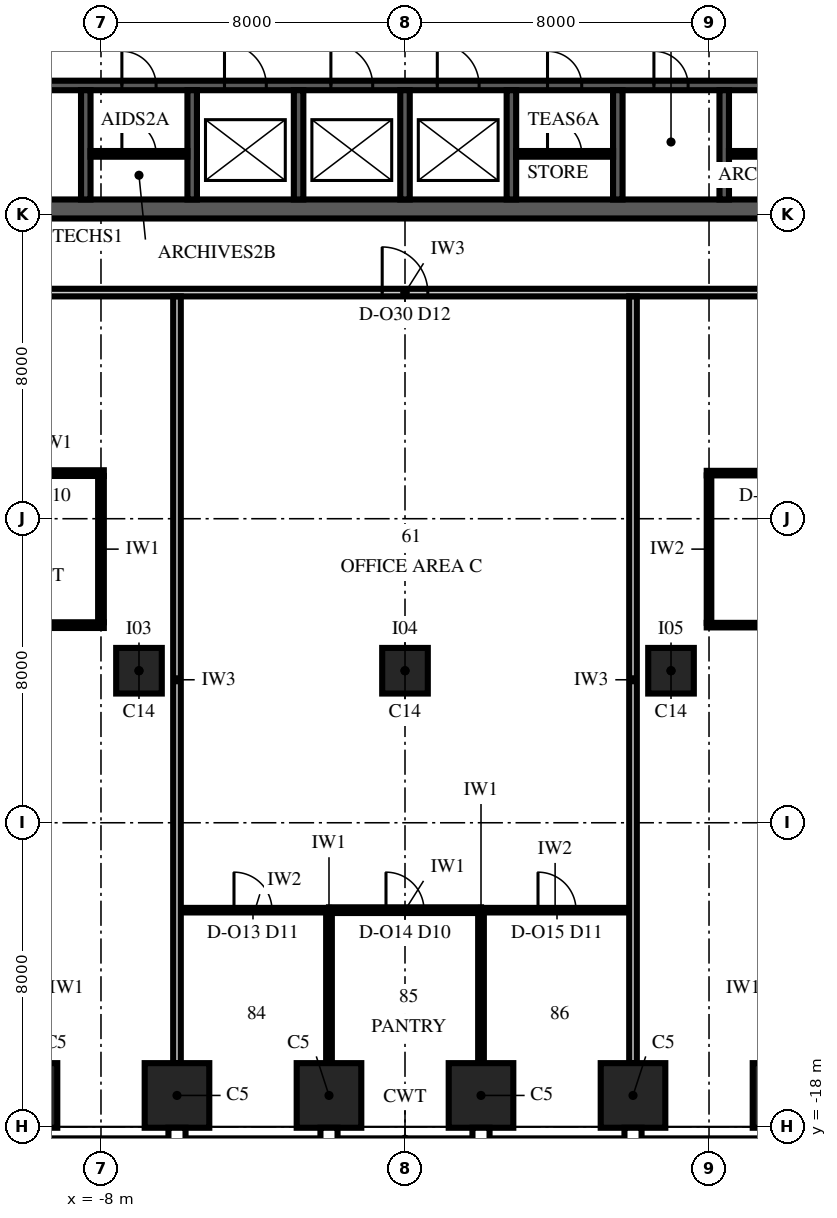
"""IFC4 building model, lengths in metres.
Left out: names, types, materials, properties, quantities, classifications, styles, units other than length and angle.
Written with IfcOpenShell. Run it as: python <this file> out.ifc"""

import sys

from ifc_helpers import new_model, si_unit, direction, frame, frame_2d, origin, origin_2d, place, context, subcontext, project, spatial, rectangle, extrude, element, fill, save


model = new_model("IFC4")
c1 = context("Model", 3, precision=1e-05, world=origin(), true_north=direction((0.0, 1.0)))
c2 = subcontext(c1, "Body", "Model", "MODEL_VIEW")
j1 = project(units=[si_unit("LENGTHUNIT", "METRE"), si_unit("PLANEANGLEUNIT", "RADIAN")], contexts=[c1])
p1 = place(None, origin())
s1 = spatial("IfcSite", under=j1, at=p1, CompositionType="ELEMENT")
p2 = place(p1, origin())
s2 = spatial("IfcBuilding", under=s1, at=p2, CompositionType="ELEMENT")
p3 = place(p2, frame((0.0, 0.0, 248.0)))
s3 = spatial("IfcBuildingStorey", under=s2, at=p3, CompositionType="ELEMENT", Elevation=248.0)
for number, where, z_axis, x_axis in (
    (1, (-10.0, -17.175, 0.0), (0.0, 0.0, 1.0), (1.0, 0.0, 0.0)),
    (2, (-6.0, -17.175, 0.0), (0.0, 0.0, 1.0), (1.0, 0.0, 0.0)),
    (3, (-2.0, -17.175, 0.0), (0.0, 0.0, 1.0), (1.0, 0.0, 0.0)),
    (4, (2.0, -17.175, 0.0), (0.0, 0.0, 1.0), (1.0, 0.0, 0.0)),
    (5, (6.0, -17.175, 0.0), (0.0, 0.0, 1.0), (1.0, 0.0, 0.0)),
    (6, (10.0, -17.175, 0.0), (0.0, 0.0, 1.0), (1.0, 0.0, 0.0)),
):
    element("IfcColumn", number, at=place(p3, frame(where, z_axis=z_axis, x_axis=x_axis)), inside=s3, PredefinedType="COLUMN", context=c2, shape_type="SweptSolid", body=[
        extrude(rectangle(XDim=1.7, YDim=1.7, at=origin_2d()), origin(), (0.0, 0.0, 1.0), 4.0),
    ])
for number, where, z_axis, x_axis in (
    (7, (-7.0, -6.0, 0.0), (0.0, 0.0, 1.0), (1.0, 0.0, 0.0)),
    (8, (0.0, -6.0, 0.0), (0.0, 0.0, 1.0), (1.0, 0.0, 0.0)),
    (9, (7.0, -6.0, 0.0), (0.0, 0.0, 1.0), (1.0, 0.0, 0.0)),
):
    element("IfcColumn", number, at=place(p3, frame(where, z_axis=z_axis, x_axis=x_axis)), inside=s3, PredefinedType="COLUMN", context=c2, shape_type="SweptSolid", body=[
        extrude(rectangle(XDim=1.2, YDim=1.2, at=origin_2d()), origin(), (0.0, 0.0, 1.0), 4.0),
    ])
p4 = place(p3, frame((-13.85, 6.15, 0.0), z_axis=(0.0, 0.0, 1.0), x_axis=(1.0, 0.0, 0.0)))
e10 = element("IfcWall", 10, at=p4, inside=s3, PredefinedType="SHEAR", context=c2, shape_type="SweptSolid", body=[
    extrude(rectangle(XDim=27.7, YDim=0.5, at=frame_2d((13.85, 0.0))), origin(), (0.0, 0.0, 1.0), 4.0),
])
p5 = place(p3, frame((-13.6, 9.4, 0.0), z_axis=(0.0, 0.0, 1.0), x_axis=(1.0, 0.0, 0.0)))
e11 = element("IfcWall", 11, at=p5, inside=s3, PredefinedType="SHEAR", context=c2, shape_type="SweptSolid", body=[
    extrude(rectangle(XDim=27.2, YDim=0.25, at=frame_2d((13.6, 0.0))), origin(), (0.0, 0.0, 1.0), 4.0),
])
p6 = place(p5, frame((8.85, 0.0, 0.0)))
e12 = element("IfcOpeningElement", 12, at=p6, cuts=e11, PredefinedType="OPENING", context=c2, shape_type="SweptSolid", body=[
    extrude(rectangle(XDim=1.1, YDim=2.1, at=frame_2d((0.55, 1.05))), frame((0.0, 0.14, 0.0), z_axis=(0.0, -1.0, 0.0), x_axis=(1.0, 0.0, 0.0)), (0.0, 0.0, 1.0), 0.28),
])
p7 = place(p5, frame((11.65, 0.0, 0.0)))
e13 = element("IfcOpeningElement", 13, at=p7, cuts=e11, PredefinedType="OPENING", context=c2, shape_type="SweptSolid", body=[
    extrude(rectangle(XDim=1.1, YDim=2.1, at=frame_2d((0.55, 1.05))), frame((0.0, 0.14, 0.0), z_axis=(0.0, -1.0, 0.0), x_axis=(1.0, 0.0, 0.0)), (0.0, 0.0, 1.0), 0.28),
])
p8 = place(p5, frame((14.45, 0.0, 0.0)))
e14 = element("IfcOpeningElement", 14, at=p8, cuts=e11, PredefinedType="OPENING", context=c2, shape_type="SweptSolid", body=[
    extrude(rectangle(XDim=1.1, YDim=2.1, at=frame_2d((0.55, 1.05))), frame((0.0, 0.14, 0.0), z_axis=(0.0, -1.0, 0.0), x_axis=(1.0, 0.0, 0.0)), (0.0, 0.0, 1.0), 0.28),
])
p9 = place(p5, frame((0.55, 0.0, 0.0)))
e15 = element("IfcOpeningElement", 15, at=p9, cuts=e11, PredefinedType="OPENING", context=c2, shape_type="SweptSolid", body=[
    extrude(rectangle(XDim=0.9, YDim=2.1, at=frame_2d((0.45, 1.05))), frame((0.0, 0.14, 0.0), z_axis=(0.0, -1.0, 0.0), x_axis=(1.0, 0.0, 0.0)), (0.0, 0.0, 1.0), 0.28),
])
p10 = place(p5, frame((3.35, 0.0, 0.0)))
e16 = element("IfcOpeningElement", 16, at=p10, cuts=e11, PredefinedType="OPENING", context=c2, shape_type="SweptSolid", body=[
    extrude(rectangle(XDim=0.9, YDim=2.1, at=frame_2d((0.45, 1.05))), frame((0.0, 0.14, 0.0), z_axis=(0.0, -1.0, 0.0), x_axis=(1.0, 0.0, 0.0)), (0.0, 0.0, 1.0), 0.28),
])
p11 = place(p5, frame((6.15, 0.0, 0.0)))
e17 = element("IfcOpeningElement", 17, at=p11, cuts=e11, PredefinedType="OPENING", context=c2, shape_type="SweptSolid", body=[
    extrude(rectangle(XDim=0.9, YDim=2.1, at=frame_2d((0.45, 1.05))), frame((0.0, 0.14, 0.0), z_axis=(0.0, -1.0, 0.0), x_axis=(1.0, 0.0, 0.0)), (0.0, 0.0, 1.0), 0.28),
])
p12 = place(p5, frame((17.35, 0.0, 0.0)))
e18 = element("IfcOpeningElement", 18, at=p12, cuts=e11, PredefinedType="OPENING", context=c2, shape_type="SweptSolid", body=[
    extrude(rectangle(XDim=0.9, YDim=2.1, at=frame_2d((0.45, 1.05))), frame((0.0, 0.14, 0.0), z_axis=(0.0, -1.0, 0.0), x_axis=(1.0, 0.0, 0.0)), (0.0, 0.0, 1.0), 0.28),
])
p13 = place(p5, frame((20.15, 0.0, 0.0)))
e19 = element("IfcOpeningElement", 19, at=p13, cuts=e11, PredefinedType="OPENING", context=c2, shape_type="SweptSolid", body=[
    extrude(rectangle(XDim=0.9, YDim=2.1, at=frame_2d((0.45, 1.05))), frame((0.0, 0.14, 0.0), z_axis=(0.0, -1.0, 0.0), x_axis=(1.0, 0.0, 0.0)), (0.0, 0.0, 1.0), 0.28),
])
p14 = place(p5, frame((22.95, 0.0, 0.0)))
e20 = element("IfcOpeningElement", 20, at=p14, cuts=e11, PredefinedType="OPENING", context=c2, shape_type="SweptSolid", body=[
    extrude(rectangle(XDim=0.9, YDim=2.1, at=frame_2d((0.45, 1.05))), frame((0.0, 0.14, 0.0), z_axis=(0.0, -1.0, 0.0), x_axis=(1.0, 0.0, 0.0)), (0.0, 0.0, 1.0), 0.28),
])
for number, where, z_axis, x_axis in (
    (21, (-8.4, 6.4, 0.0), (0.0, 0.0, 1.0), (0.0, 1.0, 0.0)),
    (22, (-5.6, 6.4, 0.0), (0.0, 0.0, 1.0), (0.0, 1.0, 0.0)),
    (23, (-2.8, 6.4, 0.0), (0.0, 0.0, 1.0), (0.0, 1.0, 0.0)),
    (24, (0.0, 6.4, 0.0), (0.0, 0.0, 1.0), (0.0, 1.0, 0.0)),
    (25, (2.8, 6.4, 0.0), (0.0, 0.0, 1.0), (0.0, 1.0, 0.0)),
    (26, (5.6, 6.4, 0.0), (0.0, 0.0, 1.0), (0.0, 1.0, 0.0)),
    (27, (8.4, 6.4, 0.0), (0.0, 0.0, 1.0), (0.0, 1.0, 0.0)),
):
    element("IfcWall", number, at=place(p3, frame(where, z_axis=z_axis, x_axis=x_axis)), inside=s3, PredefinedType="SHEAR", context=c2, shape_type="SweptSolid", body=[
        extrude(rectangle(XDim=2.875, YDim=0.25, at=frame_2d((1.438, 0.0))), origin(), (0.0, 0.0, 1.0), 4.0),
    ])
p15 = place(p3, frame((-8.275, 7.6, 0.0), z_axis=(0.0, 0.0, 1.0), x_axis=(1.0, 0.0, 0.0)))
e28 = element("IfcWall", 28, at=p15, inside=s3, PredefinedType="PARTITIONING", context=c2, shape_type="SweptSolid", body=[
    extrude(rectangle(XDim=2.55, YDim=0.15, at=frame_2d((1.275, 0.0))), origin(), (0.0, 0.0, 1.0), 3.85),
])
p16 = place(p15, frame((0.825, 0.0, 0.0)))
e29 = element("IfcOpeningElement", 29, at=p16, cuts=e28, PredefinedType="OPENING", context=c2, shape_type="SweptSolid", body=[
    extrude(rectangle(XDim=0.9, YDim=2.1, at=frame_2d((0.45, 1.05))), frame((0.0, 0.09, 0.0), z_axis=(0.0, -1.0, 0.0), x_axis=(1.0, 0.0, 0.0)), (0.0, 0.0, 1.0), 0.18),
])
p17 = place(p3, frame((2.925, 7.6, 0.0), z_axis=(0.0, 0.0, 1.0), x_axis=(1.0, 0.0, 0.0)))
e30 = element("IfcWall", 30, at=p17, inside=s3, PredefinedType="PARTITIONING", context=c2, shape_type="SweptSolid", body=[
    extrude(rectangle(XDim=2.55, YDim=0.15, at=frame_2d((1.275, 0.0))), origin(), (0.0, 0.0, 1.0), 3.85),
])
p18 = place(p17, frame((0.825, 0.0, 0.0)))
e31 = element("IfcOpeningElement", 31, at=p18, cuts=e30, PredefinedType="OPENING", context=c2, shape_type="SweptSolid", body=[
    extrude(rectangle(XDim=0.9, YDim=2.1, at=frame_2d((0.45, 1.05))), frame((0.0, 0.09, 0.0), z_axis=(0.0, -1.0, 0.0), x_axis=(1.0, 0.0, 0.0)), (0.0, 0.0, 1.0), 0.18),
])
p19 = place(p3, frame((8.525, 7.6, 0.0), z_axis=(0.0, 0.0, 1.0), x_axis=(1.0, 0.0, 0.0)))
e32 = element("IfcWall", 32, at=p19, inside=s3, PredefinedType="PARTITIONING", context=c2, shape_type="SweptSolid", body=[
    extrude(rectangle(XDim=2.55, YDim=0.15, at=frame_2d((1.275, 0.0))), origin(), (0.0, 0.0, 1.0), 3.85),
])
p20 = place(p19, frame((0.825, 0.0, 0.0)))
e33 = element("IfcOpeningElement", 33, at=p20, cuts=e32, PredefinedType="OPENING", context=c2, shape_type="SweptSolid", body=[
    extrude(rectangle(XDim=0.9, YDim=2.1, at=frame_2d((0.45, 1.05))), frame((0.0, 0.09, 0.0), z_axis=(0.0, -1.0, 0.0), x_axis=(1.0, 0.0, 0.0)), (0.0, 0.0, 1.0), 0.18),
])
p21 = place(p3, frame((-5.9, -12.3, 0.0), z_axis=(0.0, 0.0, 1.0), x_axis=(1.0, 0.0, 0.0)))
e34 = element("IfcWall", 34, at=p21, inside=s3, PredefinedType="PARTITIONING", context=c2, shape_type="SweptSolid", body=[
    extrude(rectangle(XDim=3.9, YDim=0.12, at=frame_2d((1.95, 0.0))), origin(), (0.0, 0.0, 1.0), 3.23),
])
p22 = place(p21, frame((1.4, 0.0, 0.0)))
e35 = element("IfcOpeningElement", 35, at=p22, cuts=e34, PredefinedType="OPENING", context=c2, shape_type="SweptSolid", body=[
    extrude(rectangle(XDim=1.0, YDim=2.4, at=frame_2d((0.5, 1.2))), frame((0.0, 0.075, 0.0), z_axis=(0.0, -1.0, 0.0), x_axis=(1.0, 0.0, 0.0)), (0.0, 0.0, 1.0), 0.15),
])
p23 = place(p3, frame((-2.0, -12.3, 0.0), z_axis=(0.0, 0.0, 1.0), x_axis=(1.0, 0.0, 0.0)))
e36 = element("IfcWall", 36, at=p23, inside=s3, PredefinedType="PARTITIONING", context=c2, shape_type="SweptSolid", body=[
    extrude(rectangle(XDim=4.0, YDim=0.15, at=frame_2d((2.0, 0.0))), origin(), (0.0, 0.0, 1.0), 3.23),
])
p24 = place(p23, frame((1.5, 0.0, 0.0)))
e37 = element("IfcOpeningElement", 37, at=p24, cuts=e36, PredefinedType="OPENING", context=c2, shape_type="SweptSolid", body=[
    extrude(rectangle(XDim=1.0, YDim=2.3, at=frame_2d((0.5, 1.15))), frame((0.0, 0.09, 0.0), z_axis=(0.0, -1.0, 0.0), x_axis=(1.0, 0.0, 0.0)), (0.0, 0.0, 1.0), 0.18),
])
p25 = place(p3, frame((2.0, -12.3, 0.0), z_axis=(0.0, 0.0, 1.0), x_axis=(1.0, 0.0, 0.0)))
e38 = element("IfcWall", 38, at=p25, inside=s3, PredefinedType="PARTITIONING", context=c2, shape_type="SweptSolid", body=[
    extrude(rectangle(XDim=3.9, YDim=0.12, at=frame_2d((1.95, 0.0))), origin(), (0.0, 0.0, 1.0), 3.23),
])
p26 = place(p25, frame((1.5, 0.0, 0.0)))
e39 = element("IfcOpeningElement", 39, at=p26, cuts=e38, PredefinedType="OPENING", context=c2, shape_type="SweptSolid", body=[
    extrude(rectangle(XDim=1.0, YDim=2.4, at=frame_2d((0.5, 1.2))), frame((0.0, 0.075, 0.0), z_axis=(0.0, -1.0, 0.0), x_axis=(1.0, 0.0, 0.0)), (0.0, 0.0, 1.0), 0.15),
])
p27 = place(p3, frame((-12.0, -4.8, 0.0), z_axis=(0.0, 0.0, 1.0), x_axis=(1.0, 0.0, 0.0)))
e40 = element("IfcWall", 40, at=p27, inside=s3, PredefinedType="PARTITIONING", context=c2, shape_type="SweptSolid", body=[
    extrude(rectangle(XDim=4.075, YDim=0.15, at=frame_2d((2.038, 0.0))), origin(), (0.0, 0.0, 1.0), 3.23),
])
p28 = place(p3, frame((7.94, -4.8, 0.0), z_axis=(0.0, 0.0, 1.0), x_axis=(1.0, 0.0, 0.0)))
e41 = element("IfcWall", 41, at=p28, inside=s3, PredefinedType="PARTITIONING", context=c2, shape_type="SweptSolid", body=[
    extrude(rectangle(XDim=10.12, YDim=0.12, at=frame_2d((5.06, 0.0))), origin(), (0.0, 0.0, 1.0), 3.23),
])
p29 = place(p3, frame((-12.06, -0.8, 0.0), z_axis=(0.0, 0.0, 1.0), x_axis=(1.0, 0.0, 0.0)))
e42 = element("IfcWall", 42, at=p29, inside=s3, PredefinedType="PARTITIONING", context=c2, shape_type="SweptSolid", body=[
    extrude(rectangle(XDim=4.135, YDim=0.15, at=frame_2d((2.067, 0.0))), origin(), (0.0, 0.0, 1.0), 3.23),
])
p30 = place(p29, frame((1.56, 0.0, 0.0)))
e43 = element("IfcOpeningElement", 43, at=p30, cuts=e42, PredefinedType="OPENING", context=c2, shape_type="SweptSolid", body=[
    extrude(rectangle(XDim=1.0, YDim=2.3, at=frame_2d((0.5, 1.15))), frame((0.0, 0.09, 0.0), z_axis=(0.0, -1.0, 0.0), x_axis=(1.0, 0.0, 0.0)), (0.0, 0.0, 1.0), 0.18),
])
p31 = place(p3, frame((7.94, -0.8, 0.0), z_axis=(0.0, 0.0, 1.0), x_axis=(1.0, 0.0, 0.0)))
e44 = element("IfcWall", 44, at=p31, inside=s3, PredefinedType="PARTITIONING", context=c2, shape_type="SweptSolid", body=[
    extrude(rectangle(XDim=4.12, YDim=0.12, at=frame_2d((2.06, 0.0))), origin(), (0.0, 0.0, 1.0), 3.23),
])
p32 = place(p31, frame((1.56, 0.0, 0.0)))
e45 = element("IfcOpeningElement", 45, at=p32, cuts=e44, PredefinedType="OPENING", context=c2, shape_type="SweptSolid", body=[
    extrude(rectangle(XDim=1.0, YDim=2.4, at=frame_2d((0.5, 1.2))), frame((0.0, 0.075, 0.0), z_axis=(0.0, -1.0, 0.0), x_axis=(1.0, 0.0, 0.0)), (0.0, 0.0, 1.0), 0.15),
])
p33 = place(p3, frame((-15.95, 3.95, 0.0), z_axis=(0.0, 0.0, 1.0), x_axis=(1.0, 0.0, 0.0)))
e46 = element("IfcWall", 46, at=p33, inside=s3, PredefinedType="PARTITIONING", context=c2, shape_type="SweptSolid", body=[
    extrude(rectangle(XDim=31.9, YDim=0.2, at=frame_2d((15.95, 0.0))), origin(), (0.0, 0.0, 1.0), 3.23),
])
p34 = place(p33, frame((3.35, 0.0, 0.0)))
e47 = element("IfcOpeningElement", 47, at=p34, cuts=e46, PredefinedType="OPENING", context=c2, shape_type="SweptSolid", body=[
    extrude(rectangle(XDim=1.2, YDim=2.4, at=frame_2d((0.6, 1.2))), frame((0.0, 0.115, 0.0), z_axis=(0.0, -1.0, 0.0), x_axis=(1.0, 0.0, 0.0)), (0.0, 0.0, 1.0), 0.23),
])
p35 = place(p33, frame((27.35, 0.0, 0.0)))
e48 = element("IfcOpeningElement", 48, at=p35, cuts=e46, PredefinedType="OPENING", context=c2, shape_type="SweptSolid", body=[
    extrude(rectangle(XDim=1.2, YDim=2.4, at=frame_2d((0.6, 1.2))), frame((0.0, 0.115, 0.0), z_axis=(0.0, -1.0, 0.0), x_axis=(1.0, 0.0, 0.0)), (0.0, 0.0, 1.0), 0.23),
])
p36 = place(p33, frame((15.35, 0.0, 0.0)))
e49 = element("IfcOpeningElement", 49, at=p36, cuts=e46, PredefinedType="OPENING", context=c2, shape_type="SweptSolid", body=[
    extrude(rectangle(XDim=1.2, YDim=2.4, at=frame_2d((0.6, 1.2))), frame((0.0, 0.115, 0.0), z_axis=(0.0, -1.0, 0.0), x_axis=(1.0, 0.0, 0.0)), (0.0, 0.0, 1.0), 0.23),
])
p37 = place(p3, frame((-8.0, -4.725, 0.0), z_axis=(0.0, 0.0, 1.0), x_axis=(0.0, 1.0, 0.0)))
e50 = element("IfcWall", 50, at=p37, inside=s3, PredefinedType="PARTITIONING", context=c2, shape_type="SweptSolid", body=[
    extrude(rectangle(XDim=3.85, YDim=0.15, at=frame_2d((1.925, 0.0))), origin(), (0.0, 0.0, 1.0), 3.85),
])
p38 = place(p3, frame((-6.0, -16.325, 0.0), z_axis=(0.0, 0.0, 1.0), x_axis=(0.0, 1.0, 0.0)))
e51 = element("IfcWall", 51, at=p38, inside=s3, PredefinedType="PARTITIONING", context=c2, shape_type="SweptSolid", body=[
    extrude(rectangle(XDim=20.175, YDim=0.2, at=frame_2d((10.087, 0.0))), origin(), (0.0, 0.0, 1.0), 2.842),
])
for number, where, z_axis, x_axis in (
    (52, (-2.0, -16.325, 0.0), (0.0, 0.0, 1.0), (0.0, 1.0, 0.0)),
    (53, (2.0, -16.325, 0.0), (0.0, 0.0, 1.0), (0.0, 1.0, 0.0)),
):
    element("IfcWall", number, at=place(p3, frame(where, z_axis=z_axis, x_axis=x_axis)), inside=s3, PredefinedType="PARTITIONING", context=c2, shape_type="SweptSolid", body=[
        extrude(rectangle(XDim=3.95, YDim=0.15, at=frame_2d((1.975, 0.0))), origin(), (0.0, 0.0, 1.0), 3.23),
    ])
p39 = place(p3, frame((6.0, -16.325, 0.0), z_axis=(0.0, 0.0, 1.0), x_axis=(0.0, 1.0, 0.0)))
e54 = element("IfcWall", 54, at=p39, inside=s3, PredefinedType="PARTITIONING", context=c2, shape_type="SweptSolid", body=[
    extrude(rectangle(XDim=20.175, YDim=0.2, at=frame_2d((10.087, 0.0))), origin(), (0.0, 0.0, 1.0), 2.842),
])
p40 = place(p3, frame((8.0, -4.74, 0.0), z_axis=(0.0, 0.0, 1.0), x_axis=(0.0, 1.0, 0.0)))
e55 = element("IfcWall", 55, at=p40, inside=s3, PredefinedType="PARTITIONING", context=c2, shape_type="SweptSolid", body=[
    extrude(rectangle(XDim=3.88, YDim=0.12, at=frame_2d((1.94, 0.0))), origin(), (0.0, 0.0, 1.0), 3.85),
])
p41 = place(p6, origin())
e56 = element("IfcDoor", 56, at=p41, inside=s3, OperationType="SLIDING_TO_LEFT", PredefinedType="DOOR", context=c2, shape_type="SweptSolid", body=[
    extrude(rectangle(XDim=1.1, YDim=2.1, at=frame_2d((0.55, 1.05))), frame((0.0, 0.125, 0.0), z_axis=(0.0, -1.0, 0.0), x_axis=(1.0, 0.0, 0.0)), (0.0, 0.0, 1.0), 0.25),
])
fill(e12, e56)
p42 = place(p7, origin())
e57 = element("IfcDoor", 57, at=p42, inside=s3, OperationType="SLIDING_TO_LEFT", PredefinedType="DOOR", context=c2, shape_type="SweptSolid", body=[
    extrude(rectangle(XDim=1.1, YDim=2.1, at=frame_2d((0.55, 1.05))), frame((0.0, 0.125, 0.0), z_axis=(0.0, -1.0, 0.0), x_axis=(1.0, 0.0, 0.0)), (0.0, 0.0, 1.0), 0.25),
])
fill(e13, e57)
p43 = place(p8, origin())
e58 = element("IfcDoor", 58, at=p43, inside=s3, OperationType="SLIDING_TO_LEFT", PredefinedType="DOOR", context=c2, shape_type="SweptSolid", body=[
    extrude(rectangle(XDim=1.1, YDim=2.1, at=frame_2d((0.55, 1.05))), frame((0.0, 0.125, 0.0), z_axis=(0.0, -1.0, 0.0), x_axis=(1.0, 0.0, 0.0)), (0.0, 0.0, 1.0), 0.25),
])
fill(e14, e58)
p44 = place(p11, origin())
e59 = element("IfcDoor", 59, at=p44, inside=s3, OperationType="SINGLE_SWING_LEFT", PredefinedType="DOOR", context=c2, shape_type="SweptSolid", body=[
    extrude(rectangle(XDim=0.9, YDim=2.1, at=frame_2d((0.45, 1.05))), frame((0.0, 0.125, 0.0), z_axis=(0.0, -1.0, 0.0), x_axis=(1.0, 0.0, 0.0)), (0.0, 0.0, 1.0), 0.25),
])
fill(e17, e59)
p45 = place(p16, origin())
e60 = element("IfcDoor", 60, at=p45, inside=s3, OperationType="SINGLE_SWING_LEFT", PredefinedType="DOOR", context=c2, shape_type="SweptSolid", body=[
    extrude(rectangle(XDim=0.9, YDim=2.1, at=frame_2d((0.45, 1.05))), frame((0.0, 0.075, 0.0), z_axis=(0.0, -1.0, 0.0), x_axis=(1.0, 0.0, 0.0)), (0.0, 0.0, 1.0), 0.149),
])
fill(e29, e60)
p46 = place(p12, origin())
e61 = element("IfcDoor", 61, at=p46, inside=s3, OperationType="SINGLE_SWING_LEFT", PredefinedType="DOOR", context=c2, shape_type="SweptSolid", body=[
    extrude(rectangle(XDim=0.9, YDim=2.1, at=frame_2d((0.45, 1.05))), frame((0.0, 0.125, 0.0), z_axis=(0.0, -1.0, 0.0), x_axis=(1.0, 0.0, 0.0)), (0.0, 0.0, 1.0), 0.25),
])
fill(e18, e61)
p47 = place(p18, origin())
e62 = element("IfcDoor", 62, at=p47, inside=s3, OperationType="SINGLE_SWING_LEFT", PredefinedType="DOOR", context=c2, shape_type="SweptSolid", body=[
    extrude(rectangle(XDim=0.9, YDim=2.1, at=frame_2d((0.45, 1.05))), frame((0.0, 0.075, 0.0), z_axis=(0.0, -1.0, 0.0), x_axis=(1.0, 0.0, 0.0)), (0.0, 0.0, 1.0), 0.149),
])
fill(e31, e62)
p48 = place(p13, origin())
e63 = element("IfcDoor", 63, at=p48, inside=s3, OperationType="SINGLE_SWING_LEFT", PredefinedType="DOOR", context=c2, shape_type="SweptSolid", body=[
    extrude(rectangle(XDim=0.9, YDim=2.1, at=frame_2d((0.45, 1.05))), frame((0.0, 0.125, 0.0), z_axis=(0.0, -1.0, 0.0), x_axis=(1.0, 0.0, 0.0)), (0.0, 0.0, 1.0), 0.25),
])
fill(e19, e63)
p49 = place(p22, origin())
e64 = element("IfcDoor", 64, at=p49, inside=s3, OperationType="SINGLE_SWING_RIGHT", PredefinedType="DOOR", context=c2, shape_type="SweptSolid", body=[
    extrude(rectangle(XDim=1.0, YDim=2.4, at=frame_2d((0.5, 1.2))), frame((0.0, 0.06, 0.0), z_axis=(0.0, -1.0, 0.0), x_axis=(1.0, 0.0, 0.0)), (0.0, 0.0, 1.0), 0.12),
])
fill(e35, e64)
p50 = place(p24, origin())
e65 = element("IfcDoor", 65, at=p50, inside=s3, OperationType="SINGLE_SWING_LEFT", PredefinedType="DOOR", context=c2, shape_type="SweptSolid", body=[
    extrude(rectangle(XDim=1.0, YDim=2.3, at=frame_2d((0.5, 1.15))), frame((0.0, 0.075, 0.0), z_axis=(0.0, -1.0, 0.0), x_axis=(1.0, 0.0, 0.0)), (0.0, 0.0, 1.0), 0.149),
])
fill(e37, e65)
p51 = place(p26, origin())
e66 = element("IfcDoor", 66, at=p51, inside=s3, OperationType="SINGLE_SWING_RIGHT", PredefinedType="DOOR", context=c2, shape_type="SweptSolid", body=[
    extrude(rectangle(XDim=1.0, YDim=2.4, at=frame_2d((0.5, 1.2))), frame((0.0, 0.06, 0.0), z_axis=(0.0, -1.0, 0.0), x_axis=(1.0, 0.0, 0.0)), (0.0, 0.0, 1.0), 0.12),
])
fill(e39, e66)
p52 = place(p36, origin())
e67 = element("IfcDoor", 67, at=p52, inside=s3, OperationType="SINGLE_SWING_LEFT", PredefinedType="DOOR", context=c2, shape_type="SweptSolid", body=[
    extrude(rectangle(XDim=1.2, YDim=2.4, at=frame_2d((0.6, 1.2))), frame((0.0, 0.1, 0.0), z_axis=(0.0, -1.0, 0.0), x_axis=(1.0, 0.0, 0.0)), (0.0, 0.0, 1.0), 0.199),
])
fill(e49, e67)
save(model, sys.argv[1])
